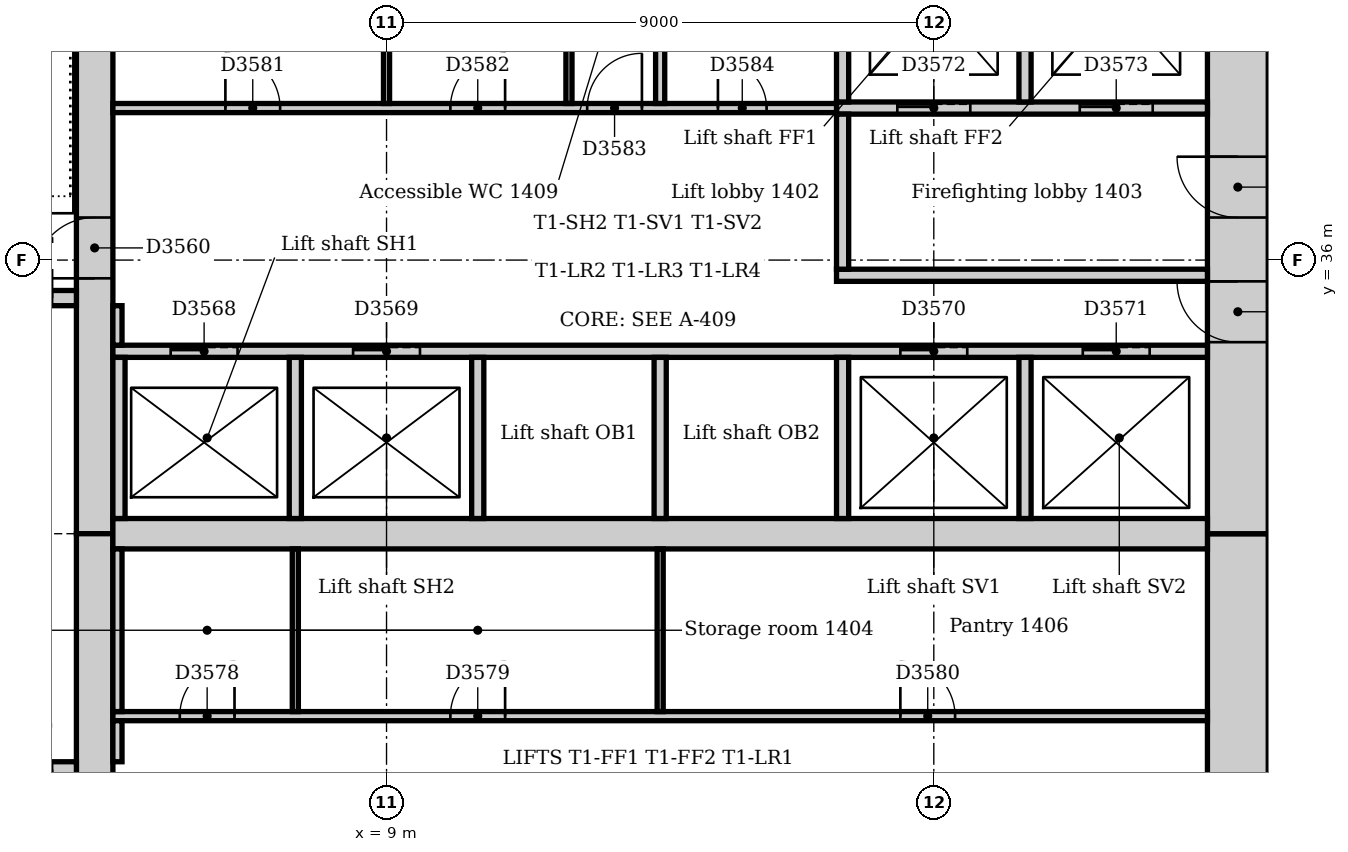
"""IFC4 building model, lengths in metres.
Left out: names, types, materials, properties, quantities, classifications, styles, units other than length and angle.
Written with IfcOpenShell. Run it as: python <this file> out.ifc"""

import sys

from ifc_helpers import new_model, si_unit, direction, frame, frame_2d, origin, place, context, subcontext, project, spatial, rectangle, extrude, element, fill, save


model = new_model("IFC4")
c1 = context("Model", 3, precision=1e-05, world=origin(), true_north=direction((0.0, 1.0)))
c2 = subcontext(c1, "Body", "Model", "MODEL_VIEW")
j1 = project(units=[si_unit("LENGTHUNIT", "METRE"), si_unit("PLANEANGLEUNIT", "RADIAN")], contexts=[c1])
p1 = place(None, origin())
s1 = spatial("IfcSite", under=j1, at=p1, CompositionType="ELEMENT")
p2 = place(p1, origin())
s2 = spatial("IfcBuilding", under=s1, at=p2, CompositionType="ELEMENT")
p3 = place(p2, frame((0.0, 0.0, 63.0)))
s3 = spatial("IfcBuildingStorey", under=s2, at=p3, CompositionType="ELEMENT", Elevation=63.0)
p4 = place(p3, frame((23.0, 21.0, 0.0), z_axis=(0.0, 0.0, 1.0), x_axis=(0.0, 1.0, 0.0)))
e1 = element("IfcWall", 1, at=p4, inside=s3, PredefinedType="SOLIDWALL", context=c2, shape_type="SweptSolid", body=[
    extrude(rectangle(XDim=10.5, YDim=1.0, at=frame_2d((5.25, 0.0))), origin(), (0.0, 0.0, 1.0), 4.0),
])
p5 = place(p4, frame((4.35, 0.0, 0.0)))
e2 = element("IfcOpeningElement", 2, at=p5, cuts=e1, PredefinedType="OPENING", context=c2, shape_type="SweptSolid", body=[
    extrude(rectangle(XDim=1.8, YDim=2.1, at=frame_2d((0.9, 1.05))), frame((0.0, 0.51, 0.0), z_axis=(0.0, -1.0, 0.0), x_axis=(1.0, 0.0, 0.0)), (0.0, 0.0, 1.0), 1.02),
])
p6 = place(p3, frame((23.0, 31.5, 0.0), z_axis=(0.0, 0.0, 1.0), x_axis=(0.0, 1.0, 0.0)))
e3 = element("IfcWall", 3, at=p6, inside=s3, PredefinedType="SOLIDWALL", context=c2, shape_type="SweptSolid", body=[
    extrude(rectangle(XDim=10.5, YDim=1.0, at=frame_2d((5.25, 0.0))), origin(), (0.0, 0.0, 1.0), 4.0),
])
p7 = place(p6, frame((3.15, 0.0, 0.0)))
e4 = element("IfcOpeningElement", 4, at=p7, cuts=e3, PredefinedType="OPENING", context=c2, shape_type="SweptSolid", body=[
    extrude(rectangle(XDim=1.0, YDim=2.1, at=frame_2d((0.5, 1.05))), frame((0.0, 0.51, 0.0), z_axis=(0.0, -1.0, 0.0), x_axis=(1.0, 0.0, 0.0)), (0.0, 0.0, 1.0), 1.02),
])
p8 = place(p6, frame((5.2, 0.0, 0.0)))
e5 = element("IfcOpeningElement", 5, at=p8, cuts=e3, PredefinedType="OPENING", context=c2, shape_type="SweptSolid", body=[
    extrude(rectangle(XDim=1.0, YDim=2.1, at=frame_2d((0.5, 1.05))), frame((0.0, 0.51, 0.0), z_axis=(0.0, -1.0, 0.0), x_axis=(1.0, 0.0, 0.0)), (0.0, 0.0, 1.0), 1.02),
])
p9 = place(p3, frame((4.2, 42.0, 0.0), z_axis=(0.0, 0.0, 1.0), x_axis=(0.0, -1.0, 0.0)))
e6 = element("IfcWall", 6, at=p9, inside=s3, PredefinedType="SOLIDWALL", context=c2, shape_type="SweptSolid", body=[
    extrude(rectangle(XDim=10.5, YDim=0.6, at=frame_2d((5.25, 0.0))), origin(), (0.0, 0.0, 1.0), 4.0),
])
p10 = place(p9, frame((5.3, 0.0, 0.0)))
e7 = element("IfcOpeningElement", 7, at=p10, cuts=e6, PredefinedType="OPENING", context=c2, shape_type="SweptSolid", body=[
    extrude(rectangle(XDim=1.0, YDim=2.1, at=frame_2d((0.5, 1.05))), frame((0.0, 0.31, 0.0), z_axis=(0.0, -1.0, 0.0), x_axis=(1.0, 0.0, 0.0)), (0.0, 0.0, 1.0), 0.62),
])
p11 = place(p3, frame((4.2, 31.5, 0.0), z_axis=(0.0, 0.0, 1.0), x_axis=(0.0, -1.0, 0.0)))
e8 = element("IfcWall", 8, at=p11, inside=s3, PredefinedType="SOLIDWALL", context=c2, shape_type="SweptSolid", body=[
    extrude(rectangle(XDim=10.5, YDim=0.6, at=frame_2d((5.25, 0.0))), origin(), (0.0, 0.0, 1.0), 4.0),
])
p12 = place(p11, frame((4.25, 0.0, 0.0)))
e9 = element("IfcOpeningElement", 9, at=p12, cuts=e8, PredefinedType="OPENING", context=c2, shape_type="SweptSolid", body=[
    extrude(rectangle(XDim=1.0, YDim=2.1, at=frame_2d((0.5, 1.05))), frame((0.0, 0.31, 0.0), z_axis=(0.0, -1.0, 0.0), x_axis=(1.0, 0.0, 0.0)), (0.0, 0.0, 1.0), 0.62),
])
p13 = place(p3, frame((4.5, 31.5, 0.0), z_axis=(0.0, 0.0, 1.0), x_axis=(1.0, 0.0, 0.0)))
e10 = element("IfcWall", 10, at=p13, inside=s3, PredefinedType="SOLIDWALL", context=c2, shape_type="SweptSolid", body=[
    extrude(rectangle(XDim=18.0, YDim=0.5, at=frame_2d((9.0, 0.0))), origin(), (0.0, 0.0, 1.0), 4.0),
])
p14 = place(p3, frame((3.9, 27.625, 0.0), z_axis=(0.0, 0.0, 1.0), x_axis=(-1.0, 0.0, 0.0)))
e11 = element("IfcWall", 11, at=p14, inside=s3, PredefinedType="SOLIDWALL", context=c2, shape_type="SweptSolid", body=[
    extrude(rectangle(XDim=3.54, YDim=0.25, at=frame_2d((1.77, 0.0))), origin(), (0.0, 0.0, 1.0), 4.0),
])
p15 = place(p14, frame((0.4, 0.0, 0.0)))
e12 = element("IfcOpeningElement", 12, at=p15, cuts=e11, PredefinedType="OPENING", context=c2, shape_type="SweptSolid", body=[
    extrude(rectangle(XDim=1.0, YDim=2.1, at=frame_2d((0.5, 1.05))), frame((0.0, 0.135, 0.0), z_axis=(0.0, -1.0, 0.0), x_axis=(1.0, 0.0, 0.0)), (0.0, 0.0, 1.0), 0.27),
])
p16 = place(p3, frame((0.36, 35.375, 0.0), z_axis=(0.0, 0.0, 1.0), x_axis=(1.0, 0.0, 0.0)))
e13 = element("IfcWall", 13, at=p16, inside=s3, PredefinedType="SOLIDWALL", context=c2, shape_type="SweptSolid", body=[
    extrude(rectangle(XDim=3.54, YDim=0.25, at=frame_2d((1.77, 0.0))), origin(), (0.0, 0.0, 1.0), 4.0),
])
p17 = place(p16, frame((2.14, 0.0, 0.0)))
e14 = element("IfcOpeningElement", 14, at=p17, cuts=e13, PredefinedType="OPENING", context=c2, shape_type="SweptSolid", body=[
    extrude(rectangle(XDim=1.0, YDim=2.1, at=frame_2d((0.5, 1.05))), frame((0.0, 0.135, 0.0), z_axis=(0.0, -1.0, 0.0), x_axis=(1.0, 0.0, 0.0)), (0.0, 0.0, 1.0), 0.27),
])
p18 = place(p3, frame((16.4, 35.75, 0.0), z_axis=(0.0, 0.0, 1.0), x_axis=(1.0, 0.0, 0.0)))
e15 = element("IfcWall", 15, at=p18, inside=s3, PredefinedType="PARTITIONING", context=c2, shape_type="SweptSolid", body=[
    extrude(rectangle(XDim=6.1, YDim=0.2, at=frame_2d((3.05, 0.0))), origin(), (0.0, 0.0, 1.0), 3.85),
])
p19 = place(p3, frame((16.4, 38.5, 0.0), z_axis=(0.0, 0.0, 1.0), x_axis=(1.0, 0.0, 0.0)))
e16 = element("IfcWall", 16, at=p19, inside=s3, PredefinedType="PARTITIONING", context=c2, shape_type="SweptSolid", body=[
    extrude(rectangle(XDim=6.1, YDim=0.2, at=frame_2d((3.05, 0.0))), origin(), (0.0, 0.0, 1.0), 3.85),
])
p20 = place(p19, frame((1.0, 0.0, 0.0)))
e17 = element("IfcOpeningElement", 17, at=p20, cuts=e16, PredefinedType="OPENING", context=c2, shape_type="SweptSolid", body=[
    extrude(rectangle(XDim=1.2, YDim=2.1, at=frame_2d((0.6, 1.05))), frame((0.0, 0.11, 0.0), z_axis=(0.0, -1.0, 0.0), x_axis=(1.0, 0.0, 0.0)), (0.0, 0.0, 1.0), 0.22),
])
p21 = place(p19, frame((4.0, 0.0, 0.0)))
e18 = element("IfcOpeningElement", 18, at=p21, cuts=e16, PredefinedType="OPENING", context=c2, shape_type="SweptSolid", body=[
    extrude(rectangle(XDim=1.2, YDim=2.1, at=frame_2d((0.6, 1.05))), frame((0.0, 0.11, 0.0), z_axis=(0.0, -1.0, 0.0), x_axis=(1.0, 0.0, 0.0)), (0.0, 0.0, 1.0), 0.22),
])
p22 = place(p3, frame((16.5, 35.85, 0.0), z_axis=(0.0, 0.0, 1.0), x_axis=(0.0, 1.0, 0.0)))
e19 = element("IfcWall", 19, at=p22, inside=s3, PredefinedType="PARTITIONING", context=c2, shape_type="SweptSolid", body=[
    extrude(rectangle(XDim=2.55, YDim=0.2, at=frame_2d((1.275, 0.0))), origin(), (0.0, 0.0, 1.0), 3.85),
])
p23 = place(p3, frame((4.5, 34.5, 0.0), z_axis=(0.0, 0.0, 1.0), x_axis=(1.0, 0.0, 0.0)))
e20 = element("IfcWall", 20, at=p23, inside=s3, PredefinedType="PARTITIONING", context=c2, shape_type="SweptSolid", body=[
    extrude(rectangle(XDim=18.0, YDim=0.2, at=frame_2d((9.0, 0.0))), origin(), (0.0, 0.0, 1.0), 3.85),
])
p24 = place(p23, frame((0.95, 0.0, 0.0)))
e21 = element("IfcOpeningElement", 21, at=p24, cuts=e20, PredefinedType="OPENING", context=c2, shape_type="SweptSolid", body=[
    extrude(rectangle(XDim=1.1, YDim=2.1, at=frame_2d((0.55, 1.05))), frame((0.0, 0.11, 0.0), z_axis=(0.0, -1.0, 0.0), x_axis=(1.0, 0.0, 0.0)), (0.0, 0.0, 1.0), 0.22),
])
p25 = place(p23, frame((3.95, 0.0, 0.0)))
e22 = element("IfcOpeningElement", 22, at=p25, cuts=e20, PredefinedType="OPENING", context=c2, shape_type="SweptSolid", body=[
    extrude(rectangle(XDim=1.1, YDim=2.1, at=frame_2d((0.55, 1.05))), frame((0.0, 0.11, 0.0), z_axis=(0.0, -1.0, 0.0), x_axis=(1.0, 0.0, 0.0)), (0.0, 0.0, 1.0), 0.22),
])
p26 = place(p23, frame((12.95, 0.0, 0.0)))
e23 = element("IfcOpeningElement", 23, at=p26, cuts=e20, PredefinedType="OPENING", context=c2, shape_type="SweptSolid", body=[
    extrude(rectangle(XDim=1.1, YDim=2.1, at=frame_2d((0.55, 1.05))), frame((0.0, 0.11, 0.0), z_axis=(0.0, -1.0, 0.0), x_axis=(1.0, 0.0, 0.0)), (0.0, 0.0, 1.0), 0.22),
])
p27 = place(p23, frame((15.95, 0.0, 0.0)))
e24 = element("IfcOpeningElement", 24, at=p27, cuts=e20, PredefinedType="OPENING", context=c2, shape_type="SweptSolid", body=[
    extrude(rectangle(XDim=1.1, YDim=2.1, at=frame_2d((0.55, 1.05))), frame((0.0, 0.11, 0.0), z_axis=(0.0, -1.0, 0.0), x_axis=(1.0, 0.0, 0.0)), (0.0, 0.0, 1.0), 0.22),
])
for number, where, z_axis, x_axis in (
    (25, (16.5, 38.6, 0.0), (0.0, 0.0, 1.0), (0.0, 1.0, 0.0)),
    (26, (19.5, 38.6, 0.0), (0.0, 0.0, 1.0), (0.0, 1.0, 0.0)),
):
    element("IfcWall", number, at=place(p3, frame(where, z_axis=z_axis, x_axis=x_axis)), inside=s3, PredefinedType="PARTITIONING", context=c2, shape_type="SweptSolid", body=[
        extrude(rectangle(XDim=3.4, YDim=0.2, at=frame_2d((1.7, 0.0))), origin(), (0.0, 0.0, 1.0), 3.85),
    ])
for number, where, z_axis, x_axis in (
    (27, (4.6, 31.75, 0.0), (0.0, 0.0, 1.0), (0.0, 1.0, 0.0)),
    (28, (7.5, 31.75, 0.0), (0.0, 0.0, 1.0), (0.0, 1.0, 0.0)),
    (29, (10.5, 31.75, 0.0), (0.0, 0.0, 1.0), (0.0, 1.0, 0.0)),
    (30, (13.5, 31.75, 0.0), (0.0, 0.0, 1.0), (0.0, 1.0, 0.0)),
    (31, (16.5, 31.75, 0.0), (0.0, 0.0, 1.0), (0.0, 1.0, 0.0)),
    (32, (19.5, 31.75, 0.0), (0.0, 0.0, 1.0), (0.0, 1.0, 0.0)),
):
    element("IfcWall", number, at=place(p3, frame(where, z_axis=z_axis, x_axis=x_axis)), inside=s3, PredefinedType="PARTITIONING", context=c2, shape_type="SweptSolid", body=[
        extrude(rectangle(XDim=2.65, YDim=0.2, at=frame_2d((1.325, 0.0))), origin(), (0.0, 0.0, 1.0), 3.85),
    ])
p28 = place(p3, frame((4.5, 28.5, 0.0), z_axis=(0.0, 0.0, 1.0), x_axis=(1.0, 0.0, 0.0)))
e33 = element("IfcWall", 33, at=p28, inside=s3, PredefinedType="PARTITIONING", context=c2, shape_type="SweptSolid", body=[
    extrude(rectangle(XDim=18.0, YDim=0.15, at=frame_2d((9.0, 0.0))), origin(), (0.0, 0.0, 1.0), 3.85),
])
p29 = place(p28, frame((1.1, 0.0, 0.0)))
e34 = element("IfcOpeningElement", 34, at=p29, cuts=e33, PredefinedType="OPENING", context=c2, shape_type="SweptSolid", body=[
    extrude(rectangle(XDim=0.9, YDim=2.1, at=frame_2d((0.45, 1.05))), frame((0.0, 0.085, 0.0), z_axis=(0.0, -1.0, 0.0), x_axis=(1.0, 0.0, 0.0)), (0.0, 0.0, 1.0), 0.17),
])
p30 = place(p28, frame((5.55, 0.0, 0.0)))
e35 = element("IfcOpeningElement", 35, at=p30, cuts=e33, PredefinedType="OPENING", context=c2, shape_type="SweptSolid", body=[
    extrude(rectangle(XDim=0.9, YDim=2.1, at=frame_2d((0.45, 1.05))), frame((0.0, 0.085, 0.0), z_axis=(0.0, -1.0, 0.0), x_axis=(1.0, 0.0, 0.0)), (0.0, 0.0, 1.0), 0.17),
])
p31 = place(p28, frame((12.95, 0.0, 0.0)))
e36 = element("IfcOpeningElement", 36, at=p31, cuts=e33, PredefinedType="OPENING", context=c2, shape_type="SweptSolid", body=[
    extrude(rectangle(XDim=0.9, YDim=2.1, at=frame_2d((0.45, 1.05))), frame((0.0, 0.085, 0.0), z_axis=(0.0, -1.0, 0.0), x_axis=(1.0, 0.0, 0.0)), (0.0, 0.0, 1.0), 0.17),
])
p32 = place(p3, frame((4.5, 38.5, 0.0), z_axis=(0.0, 0.0, 1.0), x_axis=(1.0, 0.0, 0.0)))
e37 = element("IfcWall", 37, at=p32, inside=s3, PredefinedType="PARTITIONING", context=c2, shape_type="SweptSolid", body=[
    extrude(rectangle(XDim=11.9, YDim=0.15, at=frame_2d((5.95, 0.0))), origin(), (0.0, 0.0, 1.0), 3.85),
])
p33 = place(p32, frame((1.85, 0.0, 0.0)))
e38 = element("IfcOpeningElement", 38, at=p33, cuts=e37, PredefinedType="OPENING", context=c2, shape_type="SweptSolid", body=[
    extrude(rectangle(XDim=0.9, YDim=2.1, at=frame_2d((0.45, 1.05))), frame((0.0, 0.085, 0.0), z_axis=(0.0, -1.0, 0.0), x_axis=(1.0, 0.0, 0.0)), (0.0, 0.0, 1.0), 0.17),
])
p34 = place(p32, frame((5.55, 0.0, 0.0)))
e39 = element("IfcOpeningElement", 39, at=p34, cuts=e37, PredefinedType="OPENING", context=c2, shape_type="SweptSolid", body=[
    extrude(rectangle(XDim=0.9, YDim=2.1, at=frame_2d((0.45, 1.05))), frame((0.0, 0.085, 0.0), z_axis=(0.0, -1.0, 0.0), x_axis=(1.0, 0.0, 0.0)), (0.0, 0.0, 1.0), 0.17),
])
p35 = place(p32, frame((7.8, 0.0, 0.0)))
e40 = element("IfcOpeningElement", 40, at=p35, cuts=e37, PredefinedType="OPENING", context=c2, shape_type="SweptSolid", body=[
    extrude(rectangle(XDim=0.9, YDim=2.1, at=frame_2d((0.45, 1.05))), frame((0.0, 0.085, 0.0), z_axis=(0.0, -1.0, 0.0), x_axis=(1.0, 0.0, 0.0)), (0.0, 0.0, 1.0), 0.17),
])
p36 = place(p32, frame((9.95, 0.0, 0.0)))
e41 = element("IfcOpeningElement", 41, at=p36, cuts=e37, PredefinedType="OPENING", context=c2, shape_type="SweptSolid", body=[
    extrude(rectangle(XDim=0.8, YDim=2.1, at=frame_2d((0.4, 1.05))), frame((0.0, 0.085, 0.0), z_axis=(0.0, -1.0, 0.0), x_axis=(1.0, 0.0, 0.0)), (0.0, 0.0, 1.0), 0.17),
])
p37 = place(p3, frame((4.575, 27.75, 0.0), z_axis=(0.0, 0.0, 1.0), x_axis=(0.0, 1.0, 0.0)))
e42 = element("IfcWall", 42, at=p37, inside=s3, PredefinedType="PARTITIONING", context=c2, shape_type="SweptSolid", body=[
    extrude(rectangle(XDim=0.675, YDim=0.15, at=frame_2d((0.338, 0.0))), origin(), (0.0, 0.0, 1.0), 3.85),
])
p38 = place(p3, frame((4.575, 28.575, 0.0), z_axis=(0.0, 0.0, 1.0), x_axis=(0.0, 1.0, 0.0)))
e43 = element("IfcWall", 43, at=p38, inside=s3, PredefinedType="PARTITIONING", context=c2, shape_type="SweptSolid", body=[
    extrude(rectangle(XDim=2.675, YDim=0.15, at=frame_2d((1.337, 0.0))), origin(), (0.0, 0.0, 1.0), 3.85),
])
p39 = place(p3, frame((4.575, 34.6, 0.0), z_axis=(0.0, 0.0, 1.0), x_axis=(0.0, 1.0, 0.0)))
e44 = element("IfcWall", 44, at=p39, inside=s3, PredefinedType="PARTITIONING", context=c2, shape_type="SweptSolid", body=[
    extrude(rectangle(XDim=0.65, YDim=0.15, at=frame_2d((0.325, 0.0))), origin(), (0.0, 0.0, 1.0), 3.85),
])
p40 = place(p3, frame((13.5, 38.575, 0.0), z_axis=(0.0, 0.0, 1.0), x_axis=(0.0, 1.0, 0.0)))
e45 = element("IfcWall", 45, at=p40, inside=s3, PredefinedType="PARTITIONING", context=c2, shape_type="SweptSolid", body=[
    extrude(rectangle(XDim=3.425, YDim=0.15, at=frame_2d((1.712, 0.0))), origin(), (0.0, 0.0, 1.0), 3.85),
])
for number, where, z_axis, x_axis in (
    (46, (9.0, 38.575, 0.0), (0.0, 0.0, 1.0), (0.0, 1.0, 0.0)),
    (47, (12.0, 38.575, 0.0), (0.0, 0.0, 1.0), (0.0, 1.0, 0.0)),
):
    element("IfcWall", number, at=place(p3, frame(where, z_axis=z_axis, x_axis=x_axis)), inside=s3, PredefinedType="PARTITIONING", context=c2, shape_type="SweptSolid", body=[
        extrude(rectangle(XDim=3.425, YDim=0.1, at=frame_2d((1.712, 0.0))), origin(), (0.0, 0.0, 1.0), 3.85),
    ])
for number, where, z_axis, x_axis in (
    (48, (7.5, 28.575, 0.0), (0.0, 0.0, 1.0), (0.0, 1.0, 0.0)),
    (49, (13.5, 28.575, 0.0), (0.0, 0.0, 1.0), (0.0, 1.0, 0.0)),
):
    element("IfcWall", number, at=place(p3, frame(where, z_axis=z_axis, x_axis=x_axis)), inside=s3, PredefinedType="PARTITIONING", context=c2, shape_type="SweptSolid", body=[
        extrude(rectangle(XDim=2.675, YDim=0.1, at=frame_2d((1.337, 0.0))), origin(), (0.0, 0.0, 1.0), 3.85),
    ])
p41 = place(p10, frame((1.0, 0.0, 0.0), z_axis=(0.0, 0.0, 1.0), x_axis=(-1.0, 0.0, 0.0)))
e50 = element("IfcDoor", 50, at=p41, inside=s3, OperationType="SINGLE_SWING_LEFT", PredefinedType="DOOR", context=c2, shape_type="SweptSolid", body=[
    extrude(rectangle(XDim=1.0, YDim=2.1, at=frame_2d((0.5, 1.05))), frame((0.0, 0.025, 0.0), z_axis=(0.0, -1.0, 0.0), x_axis=(1.0, 0.0, 0.0)), (0.0, 0.0, 1.0), 0.05),
])
fill(e7, e50)
p42 = place(p24, origin())
e51 = element("IfcDoor", 51, at=p42, inside=s3, OperationType="SLIDING_TO_LEFT", PredefinedType="DOOR", context=c2, shape_type="SweptSolid", body=[
    extrude(rectangle(XDim=1.1, YDim=2.1, at=frame_2d((0.55, 1.05))), frame((0.0, 0.025, 0.0), z_axis=(0.0, -1.0, 0.0), x_axis=(1.0, 0.0, 0.0)), (0.0, 0.0, 1.0), 0.05),
])
fill(e21, e51)
p43 = place(p25, origin())
e52 = element("IfcDoor", 52, at=p43, inside=s3, OperationType="SLIDING_TO_LEFT", PredefinedType="DOOR", context=c2, shape_type="SweptSolid", body=[
    extrude(rectangle(XDim=1.1, YDim=2.1, at=frame_2d((0.55, 1.05))), frame((0.0, 0.025, 0.0), z_axis=(0.0, -1.0, 0.0), x_axis=(1.0, 0.0, 0.0)), (0.0, 0.0, 1.0), 0.05),
])
fill(e22, e52)
p44 = place(p26, origin())
e53 = element("IfcDoor", 53, at=p44, inside=s3, OperationType="SLIDING_TO_LEFT", PredefinedType="DOOR", context=c2, shape_type="SweptSolid", body=[
    extrude(rectangle(XDim=1.1, YDim=2.1, at=frame_2d((0.55, 1.05))), frame((0.0, 0.025, 0.0), z_axis=(0.0, -1.0, 0.0), x_axis=(1.0, 0.0, 0.0)), (0.0, 0.0, 1.0), 0.05),
])
fill(e23, e53)
p45 = place(p27, origin())
e54 = element("IfcDoor", 54, at=p45, inside=s3, OperationType="SLIDING_TO_LEFT", PredefinedType="DOOR", context=c2, shape_type="SweptSolid", body=[
    extrude(rectangle(XDim=1.1, YDim=2.1, at=frame_2d((0.55, 1.05))), frame((0.0, 0.025, 0.0), z_axis=(0.0, -1.0, 0.0), x_axis=(1.0, 0.0, 0.0)), (0.0, 0.0, 1.0), 0.05),
])
fill(e24, e54)
p46 = place(p20, origin())
e55 = element("IfcDoor", 55, at=p46, inside=s3, OperationType="SLIDING_TO_LEFT", PredefinedType="DOOR", context=c2, shape_type="SweptSolid", body=[
    extrude(rectangle(XDim=1.2, YDim=2.1, at=frame_2d((0.6, 1.05))), frame((0.0, 0.025, 0.0), z_axis=(0.0, -1.0, 0.0), x_axis=(1.0, 0.0, 0.0)), (0.0, 0.0, 1.0), 0.05),
])
fill(e17, e55)
p47 = place(p21, origin())
e56 = element("IfcDoor", 56, at=p47, inside=s3, OperationType="SLIDING_TO_LEFT", PredefinedType="DOOR", context=c2, shape_type="SweptSolid", body=[
    extrude(rectangle(XDim=1.2, YDim=2.1, at=frame_2d((0.6, 1.05))), frame((0.0, 0.025, 0.0), z_axis=(0.0, -1.0, 0.0), x_axis=(1.0, 0.0, 0.0)), (0.0, 0.0, 1.0), 0.05),
])
fill(e18, e56)
p48 = place(p7, origin())
e57 = element("IfcDoor", 57, at=p48, inside=s3, OperationType="SINGLE_SWING_RIGHT", PredefinedType="DOOR", context=c2, shape_type="SweptSolid", body=[
    extrude(rectangle(XDim=1.0, YDim=2.1, at=frame_2d((0.5, 1.05))), frame((0.0, 0.025, 0.0), z_axis=(0.0, -1.0, 0.0), x_axis=(1.0, 0.0, 0.0)), (0.0, 0.0, 1.0), 0.05),
])
fill(e4, e57)
p49 = place(p8, origin())
e58 = element("IfcDoor", 58, at=p49, inside=s3, OperationType="SINGLE_SWING_RIGHT", PredefinedType="DOOR", context=c2, shape_type="SweptSolid", body=[
    extrude(rectangle(XDim=1.0, YDim=2.1, at=frame_2d((0.5, 1.05))), frame((0.0, 0.025, 0.0), z_axis=(0.0, -1.0, 0.0), x_axis=(1.0, 0.0, 0.0)), (0.0, 0.0, 1.0), 0.05),
])
fill(e5, e58)
p50 = place(p29, origin())
e59 = element("IfcDoor", 59, at=p50, inside=s3, OperationType="SINGLE_SWING_RIGHT", PredefinedType="DOOR", context=c2, shape_type="SweptSolid", body=[
    extrude(rectangle(XDim=0.9, YDim=2.1, at=frame_2d((0.45, 1.05))), frame((0.0, 0.025, 0.0), z_axis=(0.0, -1.0, 0.0), x_axis=(1.0, 0.0, 0.0)), (0.0, 0.0, 1.0), 0.05),
])
fill(e34, e59)
p51 = place(p30, origin())
e60 = element("IfcDoor", 60, at=p51, inside=s3, OperationType="SINGLE_SWING_RIGHT", PredefinedType="DOOR", context=c2, shape_type="SweptSolid", body=[
    extrude(rectangle(XDim=0.9, YDim=2.1, at=frame_2d((0.45, 1.05))), frame((0.0, 0.025, 0.0), z_axis=(0.0, -1.0, 0.0), x_axis=(1.0, 0.0, 0.0)), (0.0, 0.0, 1.0), 0.05),
])
fill(e35, e60)
p52 = place(p31, origin())
e61 = element("IfcDoor", 61, at=p52, inside=s3, OperationType="SINGLE_SWING_LEFT", PredefinedType="DOOR", context=c2, shape_type="SweptSolid", body=[
    extrude(rectangle(XDim=0.9, YDim=2.1, at=frame_2d((0.45, 1.05))), frame((0.0, 0.025, 0.0), z_axis=(0.0, -1.0, 0.0), x_axis=(1.0, 0.0, 0.0)), (0.0, 0.0, 1.0), 0.05),
])
fill(e36, e61)
p53 = place(p33, origin())
e62 = element("IfcDoor", 62, at=p53, inside=s3, OperationType="SINGLE_SWING_LEFT", PredefinedType="DOOR", context=c2, shape_type="SweptSolid", body=[
    extrude(rectangle(XDim=0.9, YDim=2.1, at=frame_2d((0.45, 1.05))), frame((0.0, 0.025, 0.0), z_axis=(0.0, -1.0, 0.0), x_axis=(1.0, 0.0, 0.0)), (0.0, 0.0, 1.0), 0.05),
])
fill(e38, e62)
p54 = place(p34, origin())
e63 = element("IfcDoor", 63, at=p54, inside=s3, OperationType="SINGLE_SWING_RIGHT", PredefinedType="DOOR", context=c2, shape_type="SweptSolid", body=[
    extrude(rectangle(XDim=0.9, YDim=2.1, at=frame_2d((0.45, 1.05))), frame((0.0, 0.025, 0.0), z_axis=(0.0, -1.0, 0.0), x_axis=(1.0, 0.0, 0.0)), (0.0, 0.0, 1.0), 0.05),
])
fill(e39, e63)
p55 = place(p35, origin())
e64 = element("IfcDoor", 64, at=p55, inside=s3, OperationType="SINGLE_SWING_RIGHT", PredefinedType="DOOR", context=c2, shape_type="SweptSolid", body=[
    extrude(rectangle(XDim=0.9, YDim=2.1, at=frame_2d((0.45, 1.05))), frame((0.0, 0.025, 0.0), z_axis=(0.0, -1.0, 0.0), x_axis=(1.0, 0.0, 0.0)), (0.0, 0.0, 1.0), 0.05),
])
fill(e40, e64)
p56 = place(p36, origin())
e65 = element("IfcDoor", 65, at=p56, inside=s3, OperationType="SINGLE_SWING_LEFT", PredefinedType="DOOR", context=c2, shape_type="SweptSolid", body=[
    extrude(rectangle(XDim=0.8, YDim=2.1, at=frame_2d((0.4, 1.05))), frame((0.0, 0.025, 0.0), z_axis=(0.0, -1.0, 0.0), x_axis=(1.0, 0.0, 0.0)), (0.0, 0.0, 1.0), 0.05),
])
fill(e41, e65)
save(model, sys.argv[1])
